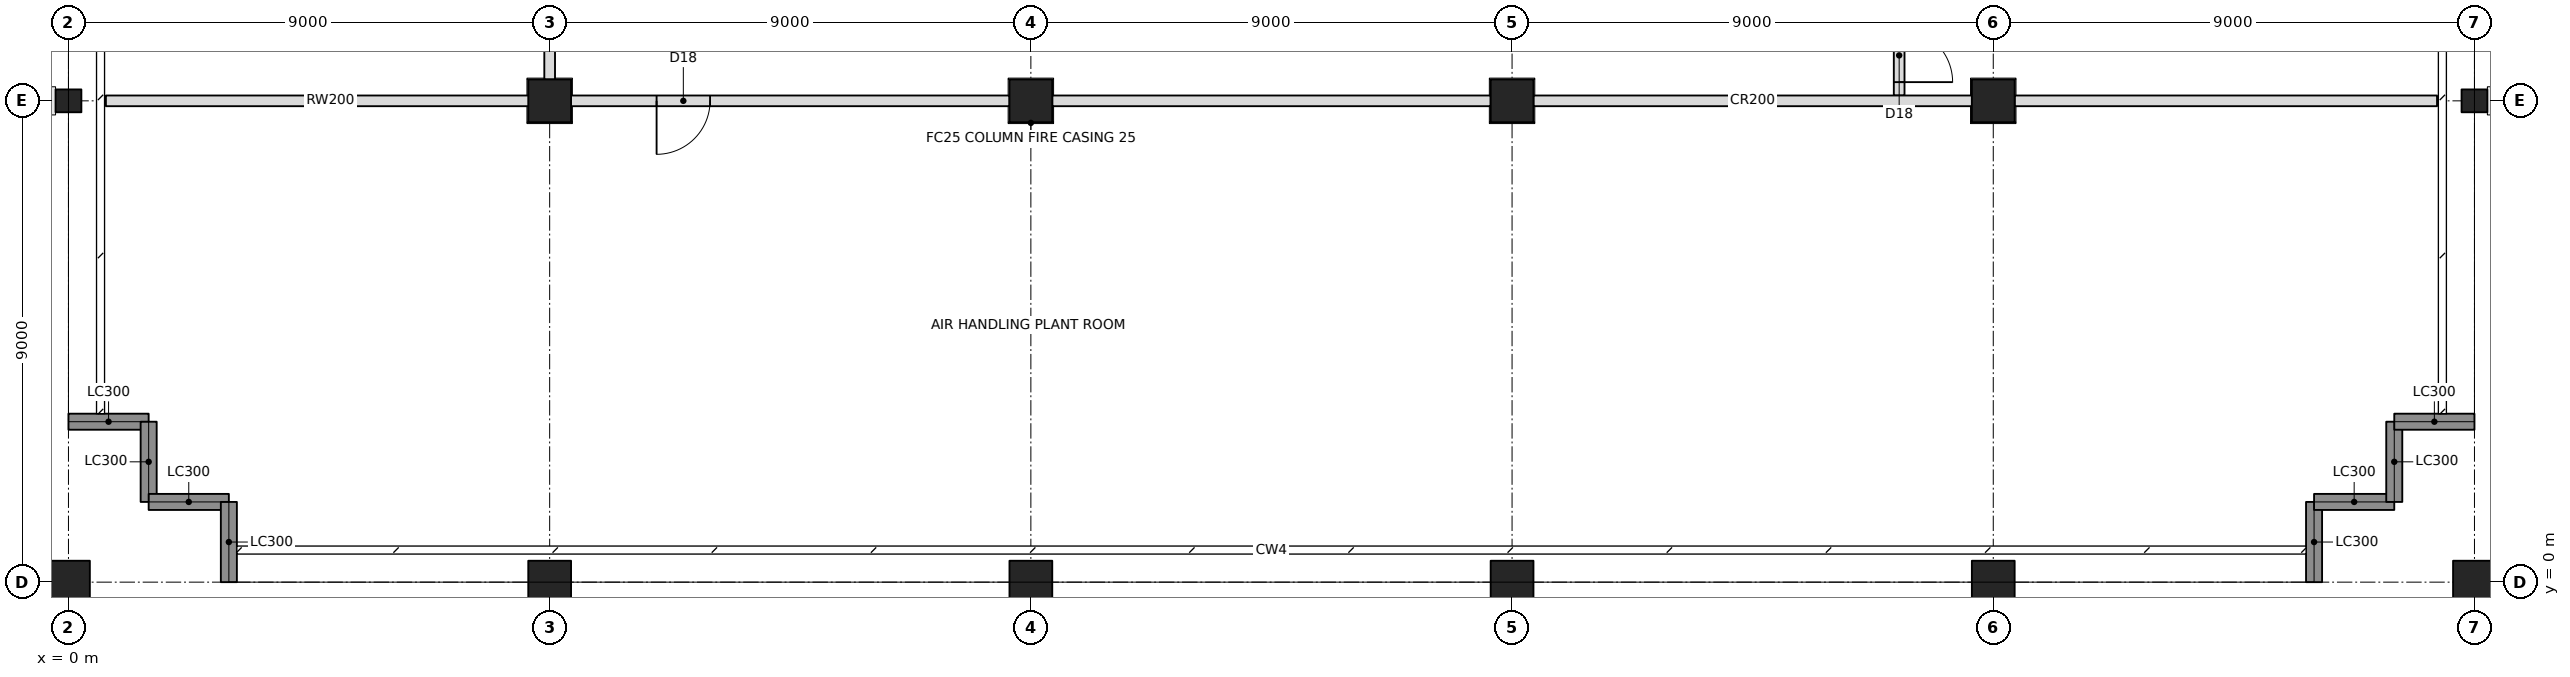
"""IFC4 building model, lengths in metres.
Left out: names, types, materials, properties, quantities, classifications, styles, units other than length and angle.
Written with IfcOpenShell. Run it as: python <this file> out.ifc"""

import sys

from ifc_helpers import new_model, si_unit, direction, frame, frame_2d, origin, origin_with_axes, origin_2d, place, context, subcontext, project, spatial, rectangle, hollow_rectangle, i_section, extrude, element, fill, save


model = new_model("IFC4")
c1 = context("Model", 3, precision=1e-05, world=origin(), true_north=direction((0.0, 1.0)))
c2 = subcontext(c1, "Body", "Model", "MODEL_VIEW")
j1 = project(units=[si_unit("LENGTHUNIT", "METRE"), si_unit("PLANEANGLEUNIT", "RADIAN")], contexts=[c1])
p1 = place(None, origin())
s1 = spatial("IfcSite", under=j1, at=p1, CompositionType="ELEMENT")
p2 = place(p1, origin())
s2 = spatial("IfcBuilding", under=s1, at=p2, CompositionType="ELEMENT")
p3 = place(p2, frame((0.0, 0.0, 221.6)))
s3 = spatial("IfcBuildingStorey", under=s2, at=p3, CompositionType="ELEMENT", Elevation=221.6)
p4 = place(p3, origin_with_axes())
e1 = element("IfcColumn", 1, at=p4, inside=s3, PredefinedType="COLUMN", context=c2, shape_type="SweptSolid", body=[
    extrude(hollow_rectangle(XDim=0.8, YDim=0.8, WallThickness=0.06, at=origin_2d()), origin(), (0.0, 0.0, 1.0), 5.0),
])
p5 = place(p3, frame((0.0, 9.0, 0.0), z_axis=(0.0, 0.0, 1.0), x_axis=(0.0, 1.0, 0.0)))
e2 = element("IfcColumn", 2, at=p5, inside=s3, PredefinedType="COLUMN", context=c2, shape_type="SweptSolid", body=[
    extrude(i_section(OverallWidth=0.427, OverallDepth=0.483, WebThickness=0.051, FlangeThickness=0.082, at=origin_2d()), origin(), (0.0, 0.0, 1.0), 5.0),
])
p6 = place(p3, frame((9.0, 0.0, 0.0), z_axis=(0.0, 0.0, 1.0), x_axis=(1.0, 0.0, 0.0)))
e3 = element("IfcColumn", 3, at=p6, inside=s3, PredefinedType="COLUMN", context=c2, shape_type="SweptSolid", body=[
    extrude(hollow_rectangle(XDim=0.8, YDim=0.8, WallThickness=0.06, at=origin_2d()), origin(), (0.0, 0.0, 1.0), 5.0),
])
p7 = place(p3, frame((9.0, 9.0, 0.0), z_axis=(0.0, 0.0, 1.0), x_axis=(1.0, 0.0, 0.0)))
e4 = element("IfcColumn", 4, at=p7, inside=s3, PredefinedType="COLUMN", context=c2, shape_type="SweptSolid", body=[
    extrude(hollow_rectangle(XDim=0.8, YDim=0.8, WallThickness=0.1, at=origin_2d()), origin(), (0.0, 0.0, 1.0), 5.0),
])
p8 = place(p3, frame((18.0, 0.0, 0.0), z_axis=(0.0, 0.0, 1.0), x_axis=(1.0, 0.0, 0.0)))
e5 = element("IfcColumn", 5, at=p8, inside=s3, PredefinedType="COLUMN", context=c2, shape_type="SweptSolid", body=[
    extrude(hollow_rectangle(XDim=0.8, YDim=0.8, WallThickness=0.06, at=origin_2d()), origin(), (0.0, 0.0, 1.0), 5.0),
])
p9 = place(p3, frame((18.0, 9.0, 0.0), z_axis=(0.0, 0.0, 1.0), x_axis=(1.0, 0.0, 0.0)))
e6 = element("IfcColumn", 6, at=p9, inside=s3, PredefinedType="COLUMN", context=c2, shape_type="SweptSolid", body=[
    extrude(hollow_rectangle(XDim=0.8, YDim=0.8, WallThickness=0.1, at=origin_2d()), origin(), (0.0, 0.0, 1.0), 5.0),
])
p10 = place(p3, frame((27.0, 0.0, 0.0), z_axis=(0.0, 0.0, 1.0), x_axis=(1.0, 0.0, 0.0)))
e7 = element("IfcColumn", 7, at=p10, inside=s3, PredefinedType="COLUMN", context=c2, shape_type="SweptSolid", body=[
    extrude(hollow_rectangle(XDim=0.8, YDim=0.8, WallThickness=0.06, at=origin_2d()), origin(), (0.0, 0.0, 1.0), 5.0),
])
p11 = place(p3, frame((27.0, 9.0, 0.0), z_axis=(0.0, 0.0, 1.0), x_axis=(1.0, 0.0, 0.0)))
e8 = element("IfcColumn", 8, at=p11, inside=s3, PredefinedType="COLUMN", context=c2, shape_type="SweptSolid", body=[
    extrude(hollow_rectangle(XDim=0.8, YDim=0.8, WallThickness=0.1, at=origin_2d()), origin(), (0.0, 0.0, 1.0), 5.0),
])
p12 = place(p3, frame((36.0, 0.0, 0.0), z_axis=(0.0, 0.0, 1.0), x_axis=(1.0, 0.0, 0.0)))
e9 = element("IfcColumn", 9, at=p12, inside=s3, PredefinedType="COLUMN", context=c2, shape_type="SweptSolid", body=[
    extrude(hollow_rectangle(XDim=0.8, YDim=0.8, WallThickness=0.06, at=origin_2d()), origin(), (0.0, 0.0, 1.0), 5.0),
])
p13 = place(p3, frame((36.0, 9.0, 0.0), z_axis=(0.0, 0.0, 1.0), x_axis=(0.0, 1.0, 0.0)))
e10 = element("IfcColumn", 10, at=p13, inside=s3, PredefinedType="COLUMN", context=c2, shape_type="SweptSolid", body=[
    extrude(hollow_rectangle(XDim=0.8, YDim=0.8, WallThickness=0.1, at=origin_2d()), origin(), (0.0, 0.0, 1.0), 5.0),
])
p14 = place(p3, frame((45.0, 0.0, 0.0), z_axis=(0.0, 0.0, 1.0), x_axis=(1.0, 0.0, 0.0)))
e11 = element("IfcColumn", 11, at=p14, inside=s3, PredefinedType="COLUMN", context=c2, shape_type="SweptSolid", body=[
    extrude(hollow_rectangle(XDim=0.8, YDim=0.8, WallThickness=0.06, at=origin_2d()), origin(), (0.0, 0.0, 1.0), 5.0),
])
p15 = place(p3, frame((45.0, 9.0, 0.0), z_axis=(0.0, 0.0, 1.0), x_axis=(0.0, 1.0, 0.0)))
e12 = element("IfcColumn", 12, at=p15, inside=s3, PredefinedType="COLUMN", context=c2, shape_type="SweptSolid", body=[
    extrude(i_section(OverallWidth=0.427, OverallDepth=0.483, WebThickness=0.051, FlangeThickness=0.082, at=origin_2d()), origin(), (0.0, 0.0, 1.0), 5.0),
])
p16 = place(p3, frame((42.0, 0.0, 0.0), z_axis=(0.0, 0.0, 1.0), x_axis=(0.0, 1.0, 0.0)))
e13 = element("IfcWall", 13, at=p16, inside=s3, PredefinedType="SOLIDWALL", context=c2, shape_type="SweptSolid", body=[
    extrude(rectangle(XDim=1.5, YDim=0.3, at=frame_2d((0.75, 0.0))), origin(), (0.0, 0.0, 1.0), 3.852),
])
for number, where, z_axis, x_axis in (
    (14, (42.0, 1.5, 0.0), (0.0, 0.0, 1.0), (1.0, 0.0, 0.0)),
    (15, (43.5, 1.5, 0.0), (0.0, 0.0, 1.0), (0.0, 1.0, 0.0)),
):
    element("IfcWall", number, at=place(p3, frame(where, z_axis=z_axis, x_axis=x_axis)), inside=s3, PredefinedType="SOLIDWALL", context=c2, shape_type="SweptSolid", body=[
        extrude(rectangle(XDim=1.5, YDim=0.3, at=frame_2d((0.75, 0.0))), origin(), (0.0, 0.0, 1.0), 4.8),
    ])
for number, where, z_axis, x_axis in (
    (16, (43.5, 3.0, 0.0), (0.0, 0.0, 1.0), (1.0, 0.0, 0.0)),
    (17, (0.0, 3.0, 0.0), (0.0, 0.0, 1.0), (1.0, 0.0, 0.0)),
):
    element("IfcWall", number, at=place(p3, frame(where, z_axis=z_axis, x_axis=x_axis)), inside=s3, PredefinedType="SOLIDWALL", context=c2, shape_type="SweptSolid", body=[
        extrude(rectangle(XDim=1.5, YDim=0.3, at=frame_2d((0.75, 0.0))), origin(), (0.0, 0.0, 1.0), 3.852),
    ])
for number, where, z_axis, x_axis in (
    (18, (1.5, 3.0, 0.0), (0.0, 0.0, 1.0), (0.0, -1.0, 0.0)),
    (19, (1.5, 1.5, 0.0), (0.0, 0.0, 1.0), (1.0, 0.0, 0.0)),
):
    element("IfcWall", number, at=place(p3, frame(where, z_axis=z_axis, x_axis=x_axis)), inside=s3, PredefinedType="SOLIDWALL", context=c2, shape_type="SweptSolid", body=[
        extrude(rectangle(XDim=1.5, YDim=0.3, at=frame_2d((0.75, 0.0))), origin(), (0.0, 0.0, 1.0), 4.8),
    ])
p17 = place(p3, frame((3.0, 1.5, 0.0), z_axis=(0.0, 0.0, 1.0), x_axis=(0.0, -1.0, 0.0)))
e20 = element("IfcWall", 20, at=p17, inside=s3, PredefinedType="SOLIDWALL", context=c2, shape_type="SweptSolid", body=[
    extrude(rectangle(XDim=1.5, YDim=0.3, at=frame_2d((0.75, 0.0))), origin(), (0.0, 0.0, 1.0), 3.852),
])
p18 = place(p3, frame((9.0, 9.4, 0.0), z_axis=(0.0, 0.0, 1.0), x_axis=(0.0, 1.0, 0.0)))
e21 = element("IfcWall", 21, at=p18, inside=s3, PredefinedType="PARTITIONING", context=c2, shape_type="SweptSolid", body=[
    extrude(rectangle(XDim=8.2, YDim=0.2, at=frame_2d((4.1, 0.0))), origin(), (0.0, 0.0, 1.0), 4.005),
])
p19 = place(p18, frame((2.6, 0.0, 0.0)))
e22 = element("IfcOpeningElement", 22, at=p19, cuts=e21, PredefinedType="OPENING", context=c2, shape_type="SweptSolid", body=[
    extrude(rectangle(XDim=1.0, YDim=2.1, at=frame_2d((0.5, 1.05))), frame((0.0, 0.11, 0.0), z_axis=(0.0, -1.0, 0.0), x_axis=(1.0, 0.0, 0.0)), (0.0, 0.0, 1.0), 0.22),
])
p20 = place(p3, frame((0.7, 9.0, 0.0), z_axis=(0.0, 0.0, 1.0), x_axis=(1.0, 0.0, 0.0)))
e23 = element("IfcWall", 23, at=p20, inside=s3, PredefinedType="PARTITIONING", context=c2, shape_type="SweptSolid", body=[
    extrude(rectangle(XDim=8.4, YDim=0.2, at=frame_2d((4.2, 0.0))), origin(), (0.0, 0.0, 1.0), 4.005),
])
p21 = place(p3, frame((9.4, 9.0, 0.0), z_axis=(0.0, 0.0, 1.0), x_axis=(1.0, 0.0, 0.0)))
e24 = element("IfcWall", 24, at=p21, inside=s3, PredefinedType="PARTITIONING", context=c2, shape_type="SweptSolid", body=[
    extrude(rectangle(XDim=8.2, YDim=0.2, at=frame_2d((4.1, 0.0))), origin(), (0.0, 0.0, 1.0), 4.005),
])
p22 = place(p21, frame((1.6, 0.0, 0.0)))
e25 = element("IfcOpeningElement", 25, at=p22, cuts=e24, PredefinedType="OPENING", context=c2, shape_type="SweptSolid", body=[
    extrude(rectangle(XDim=1.0, YDim=2.1, at=frame_2d((0.5, 1.05))), frame((0.0, 0.11, 0.0), z_axis=(0.0, -1.0, 0.0), x_axis=(1.0, 0.0, 0.0)), (0.0, 0.0, 1.0), 0.22),
])
for number, where, z_axis, x_axis in (
    (26, (18.4, 9.0, 0.0), (0.0, 0.0, 1.0), (1.0, 0.0, 0.0)),
    (27, (27.4, 9.0, 0.0), (0.0, 0.0, 1.0), (1.0, 0.0, 0.0)),
):
    element("IfcWall", number, at=place(p3, frame(where, z_axis=z_axis, x_axis=x_axis)), inside=s3, PredefinedType="PARTITIONING", context=c2, shape_type="SweptSolid", body=[
        extrude(rectangle(XDim=8.2, YDim=0.2, at=frame_2d((4.1, 0.0))), origin(), (0.0, 0.0, 1.0), 4.005),
    ])
p23 = place(p3, frame((36.4, 9.0, 0.0), z_axis=(0.0, 0.0, 1.0), x_axis=(1.0, 0.0, 0.0)))
e28 = element("IfcWall", 28, at=p23, inside=s3, PredefinedType="PARTITIONING", context=c2, shape_type="SweptSolid", body=[
    extrude(rectangle(XDim=7.9, YDim=0.2, at=frame_2d((3.95, 0.0))), origin(), (0.0, 0.0, 1.0), 4.038),
])
p24 = place(p3, frame((34.24, 9.1, 0.0), z_axis=(0.0, 0.0, 1.0), x_axis=(0.0, 1.0, 0.0)))
e29 = element("IfcWall", 29, at=p24, inside=s3, PredefinedType="PARTITIONING", context=c2, shape_type="SweptSolid", body=[
    extrude(rectangle(XDim=1.7, YDim=0.2, at=frame_2d((0.85, 0.0))), origin(), (0.0, 0.0, 1.0), 4.004),
])
p25 = place(p24, frame((0.25, 0.0, 0.0)))
e30 = element("IfcOpeningElement", 30, at=p25, cuts=e29, PredefinedType="OPENING", context=c2, shape_type="SweptSolid", body=[
    extrude(rectangle(XDim=1.0, YDim=2.1, at=frame_2d((0.5, 1.05))), frame((0.0, 0.11, 0.0), z_axis=(0.0, -1.0, 0.0), x_axis=(1.0, 0.0, 0.0)), (0.0, 0.0, 1.0), 0.22),
])
p26 = place(p22, frame((1.0, 0.0, 0.0), z_axis=(0.0, 0.0, 1.0), x_axis=(-1.0, 0.0, 0.0)))
e31 = element("IfcDoor", 31, at=p26, inside=s3, OperationType="SINGLE_SWING_RIGHT", PredefinedType="DOOR", context=c2, shape_type="SweptSolid", body=[
    extrude(rectangle(XDim=1.0, YDim=2.1, at=frame_2d((0.5, 1.05))), frame((0.0, 0.025, 0.0), z_axis=(0.0, -1.0, 0.0), x_axis=(1.0, 0.0, 0.0)), (0.0, 0.0, 1.0), 0.05),
])
fill(e25, e31)
p27 = place(p25, frame((1.0, 0.0, 0.0), z_axis=(0.0, 0.0, 1.0), x_axis=(-1.0, 0.0, 0.0)))
e32 = element("IfcDoor", 32, at=p27, inside=s3, OperationType="SINGLE_SWING_RIGHT", PredefinedType="DOOR", context=c2, shape_type="SweptSolid", body=[
    extrude(rectangle(XDim=1.0, YDim=2.1, at=frame_2d((0.5, 1.05))), frame((0.0, 0.025, 0.0), z_axis=(0.0, -1.0, 0.0), x_axis=(1.0, 0.0, 0.0)), (0.0, 0.0, 1.0), 0.05),
])
fill(e30, e32)
save(model, sys.argv[1])
